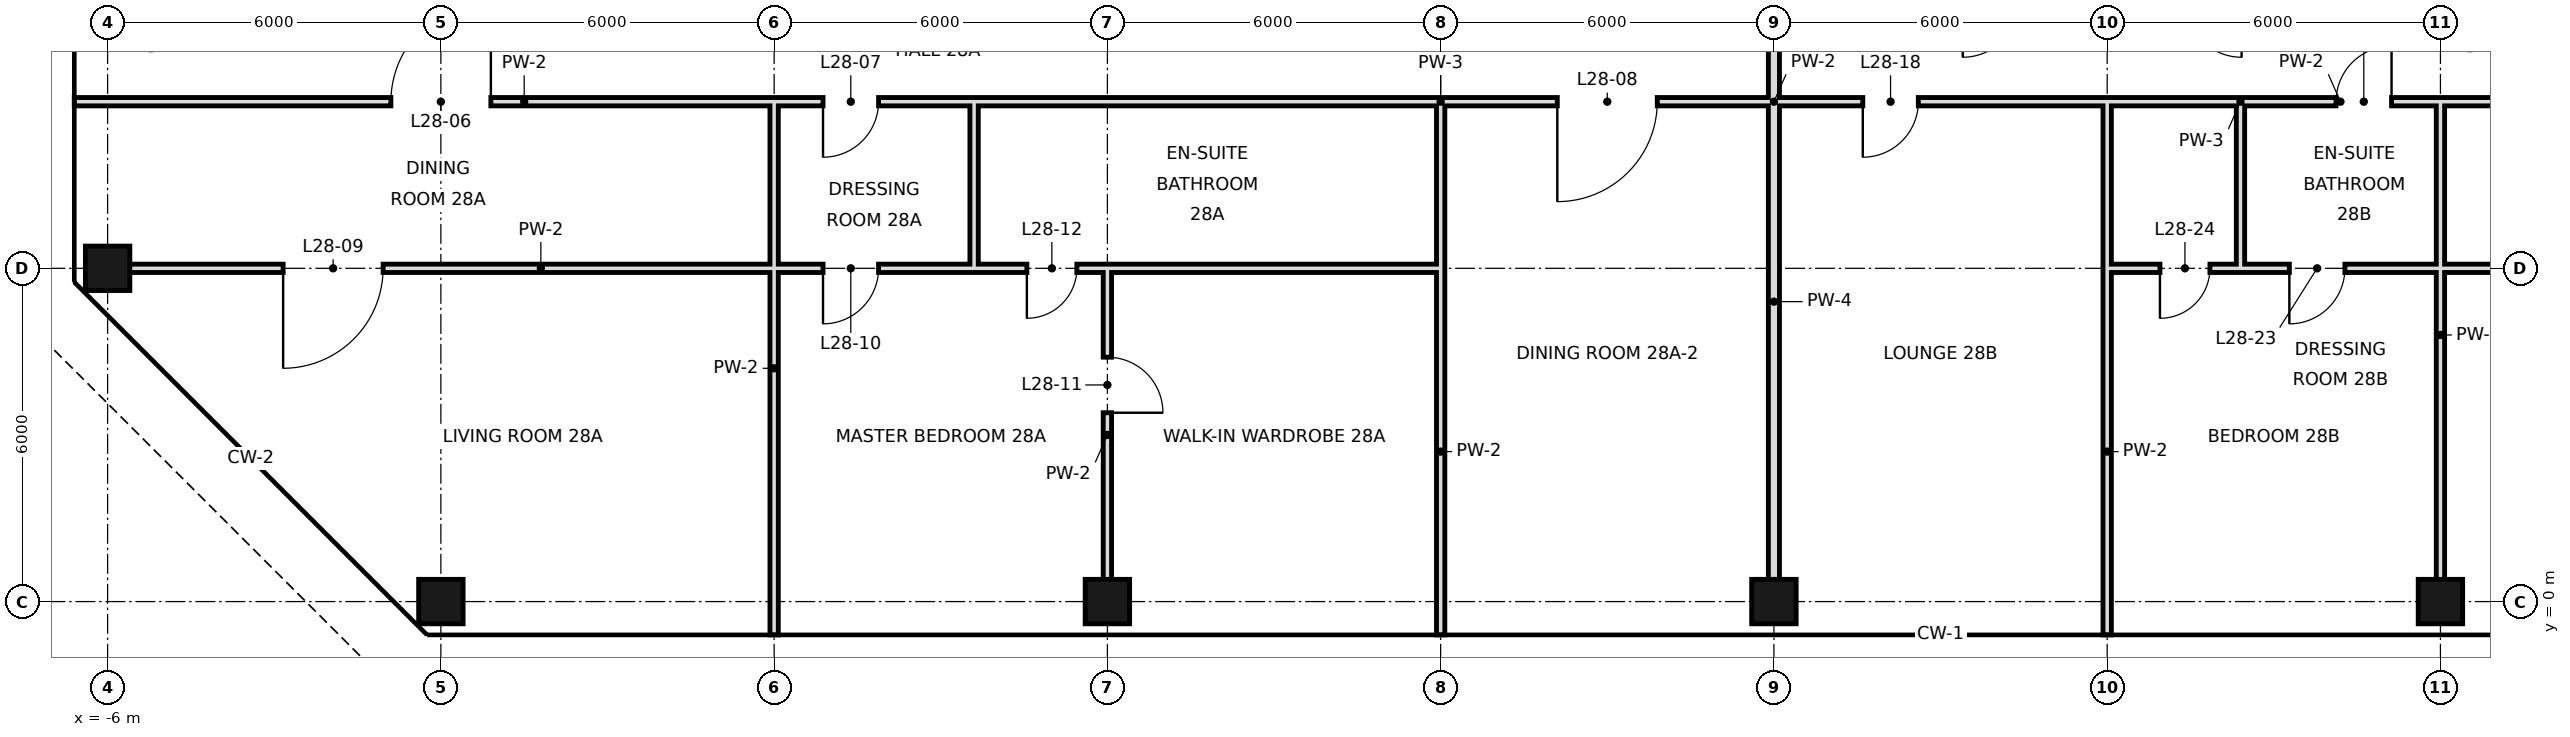
"""IFC4 building model, lengths in metres.
Left out: names, types, materials, properties, quantities, classifications, styles, units other than length and angle.
Written with IfcOpenShell. Run it as: python <this file> out.ifc"""

import sys

from ifc_helpers import new_model, si_unit, direction, frame, frame_2d, origin, origin_2d, place, context, subcontext, project, spatial, rectangle, hollow_rectangle, extrude, element, fill, save


model = new_model("IFC4")
c1 = context("Model", 3, precision=1e-05, world=origin(), true_north=direction((0.0, 1.0)))
c2 = subcontext(c1, "Body", "Model", "MODEL_VIEW")
j1 = project(units=[si_unit("LENGTHUNIT", "METRE"), si_unit("PLANEANGLEUNIT", "RADIAN")], contexts=[c1])
p1 = place(None, origin())
s1 = spatial("IfcSite", under=j1, at=p1, CompositionType="ELEMENT")
p2 = place(p1, origin())
s2 = spatial("IfcBuilding", under=s1, at=p2, CompositionType="ELEMENT")
p3 = place(p2, frame((0.0, 0.0, 126.8)))
s3 = spatial("IfcBuildingStorey", under=s2, at=p3, CompositionType="ELEMENT", Elevation=126.8)
for number, where, z_axis, x_axis in (
    (1, (-6.0, 6.0, 0.0), (0.0, 0.0, 1.0), (1.0, 0.0, 0.0)),
    (2, (0.0, 0.0, 0.0), (0.0, 0.0, 1.0), (1.0, 0.0, 0.0)),
    (3, (12.0, 0.0, 0.0), (0.0, 0.0, 1.0), (1.0, 0.0, 0.0)),
    (4, (24.0, 0.0, 0.0), (0.0, 0.0, 1.0), (1.0, 0.0, 0.0)),
    (5, (36.0, 0.0, 0.0), (0.0, 0.0, 1.0), (1.0, 0.0, 0.0)),
):
    element("IfcColumn", number, at=place(p3, frame(where, z_axis=z_axis, x_axis=x_axis)), inside=s3, PredefinedType="COLUMN", context=c2, shape_type="SweptSolid", body=[
        extrude(hollow_rectangle(XDim=0.8, YDim=0.8, WallThickness=0.04, at=origin_2d()), origin(), (0.0, 0.0, 1.0), 3.6),
    ])
p4 = place(p3, frame((12.0, 0.0, 0.0), z_axis=(0.0, 0.0, 1.0), x_axis=(0.0, 1.0, 0.0)))
e6 = element("IfcWall", 6, at=p4, inside=s3, PredefinedType="PARTITIONING", context=c2, shape_type="SweptSolid", body=[
    extrude(rectangle(XDim=6.0, YDim=0.15, at=frame_2d((3.0, 0.0))), origin(), (0.0, 0.0, 1.0), 2.72),
])
p5 = place(p4, frame((3.4, 0.0, 0.0)))
e7 = element("IfcOpeningElement", 7, at=p5, cuts=e6, PredefinedType="OPENING", context=c2, shape_type="SweptSolid", body=[
    extrude(rectangle(XDim=1.0, YDim=2.4, at=frame_2d((0.5, 1.2))), frame((0.0, 0.085, 0.0), z_axis=(0.0, -1.0, 0.0), x_axis=(1.0, 0.0, 0.0)), (0.0, 0.0, 1.0), 0.17),
])
p6 = place(p3, frame((18.0, -0.6, 0.0), z_axis=(0.0, 0.0, 1.0), x_axis=(0.0, 1.0, 0.0)))
e8 = element("IfcWall", 8, at=p6, inside=s3, PredefinedType="PARTITIONING", context=c2, shape_type="SweptSolid", body=[
    extrude(rectangle(XDim=6.6, YDim=0.15, at=frame_2d((3.3, 0.0))), origin(), (0.0, 0.0, 1.0), 2.72),
])
p7 = place(p3, frame((18.0, 6.0, 0.0), z_axis=(0.0, 0.0, 1.0), x_axis=(0.0, 1.0, 0.0)))
e9 = element("IfcWall", 9, at=p7, inside=s3, PredefinedType="PARTITIONING", context=c2, shape_type="SweptSolid", body=[
    extrude(rectangle(XDim=3.0, YDim=0.15, at=frame_2d((1.5, 0.0))), origin(), (0.0, 0.0, 1.0), 2.72),
])
p8 = place(p3, frame((24.0, 0.0, 0.0), z_axis=(0.0, 0.0, 1.0), x_axis=(0.0, 1.0, 0.0)))
e10 = element("IfcWall", 10, at=p8, inside=s3, PredefinedType="SOLIDWALL", context=c2, shape_type="SweptSolid", body=[
    extrude(rectangle(XDim=10.8, YDim=0.2, at=frame_2d((5.4, 0.0))), origin(), (0.0, 0.0, 1.0), 2.72),
])
p9 = place(p3, frame((30.0, -0.6, 0.0), z_axis=(0.0, 0.0, 1.0), x_axis=(0.0, 1.0, 0.0)))
e11 = element("IfcWall", 11, at=p9, inside=s3, PredefinedType="PARTITIONING", context=c2, shape_type="SweptSolid", body=[
    extrude(rectangle(XDim=6.6, YDim=0.15, at=frame_2d((3.3, 0.0))), origin(), (0.0, 0.0, 1.0), 2.72),
])
p10 = place(p3, frame((30.0, 6.0, 0.0), z_axis=(0.0, 0.0, 1.0), x_axis=(0.0, 1.0, 0.0)))
e12 = element("IfcWall", 12, at=p10, inside=s3, PredefinedType="PARTITIONING", context=c2, shape_type="SweptSolid", body=[
    extrude(rectangle(XDim=3.0, YDim=0.15, at=frame_2d((1.5, 0.0))), origin(), (0.0, 0.0, 1.0), 2.72),
])
p11 = place(p3, frame((32.4, 6.0, 0.0), z_axis=(0.0, 0.0, 1.0), x_axis=(0.0, 1.0, 0.0)))
e13 = element("IfcWall", 13, at=p11, inside=s3, PredefinedType="PARTITIONING", context=c2, shape_type="SweptSolid", body=[
    extrude(rectangle(XDim=3.0, YDim=0.15, at=frame_2d((1.5, 0.0))), origin(), (0.0, 0.0, 1.0), 3.42),
])
p12 = place(p3, frame((36.0, 0.0, 0.0), z_axis=(0.0, 0.0, 1.0), x_axis=(0.0, 1.0, 0.0)))
e14 = element("IfcWall", 14, at=p12, inside=s3, PredefinedType="PARTITIONING", context=c2, shape_type="SweptSolid", body=[
    extrude(rectangle(XDim=6.0, YDim=0.15, at=frame_2d((3.0, 0.0))), origin(), (0.0, 0.0, 1.0), 2.72),
])
p13 = place(p3, frame((36.0, 6.0, 0.0), z_axis=(0.0, 0.0, 1.0), x_axis=(0.0, 1.0, 0.0)))
e15 = element("IfcWall", 15, at=p13, inside=s3, PredefinedType="PARTITIONING", context=c2, shape_type="SweptSolid", body=[
    extrude(rectangle(XDim=3.0, YDim=0.15, at=frame_2d((1.5, 0.0))), origin(), (0.0, 0.0, 1.0), 2.72),
])
p14 = place(p3, frame((6.0, -0.6, 0.0), z_axis=(0.0, 0.0, 1.0), x_axis=(0.0, 1.0, 0.0)))
e16 = element("IfcWall", 16, at=p14, inside=s3, PredefinedType="PARTITIONING", context=c2, shape_type="SweptSolid", body=[
    extrude(rectangle(XDim=9.6, YDim=0.15, at=frame_2d((4.8, 0.0))), origin(), (0.0, 0.0, 1.0), 2.72),
])
p15 = place(p3, frame((9.6, 6.0, 0.0), z_axis=(0.0, 0.0, 1.0), x_axis=(0.0, 1.0, 0.0)))
e17 = element("IfcWall", 17, at=p15, inside=s3, PredefinedType="PARTITIONING", context=c2, shape_type="SweptSolid", body=[
    extrude(rectangle(XDim=3.0, YDim=0.15, at=frame_2d((1.5, 0.0))), origin(), (0.0, 0.0, 1.0), 3.42),
])
p16 = place(p3, frame((-6.0, 6.0, 0.0), z_axis=(0.0, 0.0, 1.0), x_axis=(1.0, 0.0, 0.0)))
e18 = element("IfcWall", 18, at=p16, inside=s3, PredefinedType="PARTITIONING", context=c2, shape_type="SweptSolid", body=[
    extrude(rectangle(XDim=15.6, YDim=0.15, at=frame_2d((7.8, 0.0))), origin(), (0.0, 0.0, 1.0), 2.97),
])
p17 = place(p16, frame((3.16, 0.0, 0.0)))
e19 = element("IfcOpeningElement", 19, at=p17, cuts=e18, PredefinedType="OPENING", context=c2, shape_type="SweptSolid", body=[
    extrude(rectangle(XDim=1.8, YDim=2.4, at=frame_2d((0.9, 1.2))), frame((0.0, 0.085, 0.0), z_axis=(0.0, -1.0, 0.0), x_axis=(1.0, 0.0, 0.0)), (0.0, 0.0, 1.0), 0.17),
])
p18 = place(p16, frame((12.88, 0.0, 0.0)))
e20 = element("IfcOpeningElement", 20, at=p18, cuts=e18, PredefinedType="OPENING", context=c2, shape_type="SweptSolid", body=[
    extrude(rectangle(XDim=1.0, YDim=2.4, at=frame_2d((0.5, 1.2))), frame((0.0, 0.085, 0.0), z_axis=(0.0, -1.0, 0.0), x_axis=(1.0, 0.0, 0.0)), (0.0, 0.0, 1.0), 0.17),
])
p19 = place(p3, frame((32.4, 6.0, 0.0), z_axis=(0.0, 0.0, 1.0), x_axis=(1.0, 0.0, 0.0)))
e21 = element("IfcWall", 21, at=p19, inside=s3, PredefinedType="PARTITIONING", context=c2, shape_type="SweptSolid", body=[
    extrude(rectangle(XDim=3.6, YDim=0.15, at=frame_2d((1.8, 0.0))), origin(), (0.0, 0.0, 1.0), 2.97),
])
p20 = place(p19, frame((0.88, 0.0, 0.0)))
e22 = element("IfcOpeningElement", 22, at=p20, cuts=e21, PredefinedType="OPENING", context=c2, shape_type="SweptSolid", body=[
    extrude(rectangle(XDim=1.0, YDim=2.4, at=frame_2d((0.5, 1.2))), frame((0.0, 0.085, 0.0), z_axis=(0.0, -1.0, 0.0), x_axis=(1.0, 0.0, 0.0)), (0.0, 0.0, 1.0), 0.17),
])
p21 = place(p3, frame((9.6, 6.0, 0.0), z_axis=(0.0, 0.0, 1.0), x_axis=(1.0, 0.0, 0.0)))
e23 = element("IfcWall", 23, at=p21, inside=s3, PredefinedType="PARTITIONING", context=c2, shape_type="SweptSolid", body=[
    extrude(rectangle(XDim=8.4, YDim=0.15, at=frame_2d((4.2, 0.0))), origin(), (0.0, 0.0, 1.0), 2.97),
])
p22 = place(p21, frame((0.95, 0.0, 0.0)))
e24 = element("IfcOpeningElement", 24, at=p22, cuts=e23, PredefinedType="OPENING", context=c2, shape_type="SweptSolid", body=[
    extrude(rectangle(XDim=0.9, YDim=2.4, at=frame_2d((0.45, 1.2))), frame((0.0, 0.085, 0.0), z_axis=(0.0, -1.0, 0.0), x_axis=(1.0, 0.0, 0.0)), (0.0, 0.0, 1.0), 0.17),
])
p23 = place(p3, frame((30.0, 6.0, 0.0), z_axis=(0.0, 0.0, 1.0), x_axis=(1.0, 0.0, 0.0)))
e25 = element("IfcWall", 25, at=p23, inside=s3, PredefinedType="PARTITIONING", context=c2, shape_type="SweptSolid", body=[
    extrude(rectangle(XDim=2.4, YDim=0.15, at=frame_2d((1.2, 0.0))), origin(), (0.0, 0.0, 1.0), 2.97),
])
p24 = place(p23, frame((0.95, 0.0, 0.0)))
e26 = element("IfcOpeningElement", 26, at=p24, cuts=e25, PredefinedType="OPENING", context=c2, shape_type="SweptSolid", body=[
    extrude(rectangle(XDim=0.9, YDim=2.4, at=frame_2d((0.45, 1.2))), frame((0.0, 0.085, 0.0), z_axis=(0.0, -1.0, 0.0), x_axis=(1.0, 0.0, 0.0)), (0.0, 0.0, 1.0), 0.17),
])
p25 = place(p3, frame((36.0, 6.0, 0.0), z_axis=(0.0, 0.0, 1.0), x_axis=(1.0, 0.0, 0.0)))
e27 = element("IfcWall", 27, at=p25, inside=s3, PredefinedType="PARTITIONING", context=c2, shape_type="SweptSolid", body=[
    extrude(rectangle(XDim=3.6, YDim=0.15, at=frame_2d((1.8, 0.0))), origin(), (0.0, 0.0, 1.0), 2.97),
])
p26 = place(p25, frame((1.79, 0.0, 0.0)))
e28 = element("IfcOpeningElement", 28, at=p26, cuts=e27, PredefinedType="OPENING", context=c2, shape_type="SweptSolid", body=[
    extrude(rectangle(XDim=0.9, YDim=2.4, at=frame_2d((0.45, 1.2))), frame((0.0, 0.085, 0.0), z_axis=(0.0, -1.0, 0.0), x_axis=(1.0, 0.0, 0.0)), (0.0, 0.0, 1.0), 0.17),
])
p27 = place(p3, frame((-6.6, 9.0, 0.0), z_axis=(0.0, 0.0, 1.0), x_axis=(1.0, 0.0, 0.0)))
e29 = element("IfcWall", 29, at=p27, inside=s3, PredefinedType="PARTITIONING", context=c2, shape_type="SweptSolid", body=[
    extrude(rectangle(XDim=16.2, YDim=0.15, at=frame_2d((8.1, 0.0))), origin(), (0.0, 0.0, 1.0), 3.42),
])
p28 = place(p27, frame((5.7, 0.0, 0.0)))
e30 = element("IfcOpeningElement", 30, at=p28, cuts=e29, PredefinedType="OPENING", context=c2, shape_type="SweptSolid", body=[
    extrude(rectangle(XDim=1.8, YDim=2.4, at=frame_2d((0.9, 1.2))), frame((0.0, 0.085, 0.0), z_axis=(0.0, -1.0, 0.0), x_axis=(1.0, 0.0, 0.0)), (0.0, 0.0, 1.0), 0.17),
])
p29 = place(p27, frame((13.48, 0.0, 0.0)))
e31 = element("IfcOpeningElement", 31, at=p29, cuts=e29, PredefinedType="OPENING", context=c2, shape_type="SweptSolid", body=[
    extrude(rectangle(XDim=1.0, YDim=2.4, at=frame_2d((0.5, 1.2))), frame((0.0, 0.085, 0.0), z_axis=(0.0, -1.0, 0.0), x_axis=(1.0, 0.0, 0.0)), (0.0, 0.0, 1.0), 0.17),
])
p30 = place(p3, frame((18.0, 9.0, 0.0), z_axis=(0.0, 0.0, 1.0), x_axis=(1.0, 0.0, 0.0)))
e32 = element("IfcWall", 32, at=p30, inside=s3, PredefinedType="PARTITIONING", context=c2, shape_type="SweptSolid", body=[
    extrude(rectangle(XDim=12.0, YDim=0.15, at=frame_2d((6.0, 0.0))), origin(), (0.0, 0.0, 1.0), 3.42),
])
p31 = place(p30, frame((2.1, 0.0, 0.0)))
e33 = element("IfcOpeningElement", 33, at=p31, cuts=e32, PredefinedType="OPENING", context=c2, shape_type="SweptSolid", body=[
    extrude(rectangle(XDim=1.8, YDim=2.4, at=frame_2d((0.9, 1.2))), frame((0.0, 0.085, 0.0), z_axis=(0.0, -1.0, 0.0), x_axis=(1.0, 0.0, 0.0)), (0.0, 0.0, 1.0), 0.17),
])
p32 = place(p30, frame((7.6, 0.0, 0.0)))
e34 = element("IfcOpeningElement", 34, at=p32, cuts=e32, PredefinedType="OPENING", context=c2, shape_type="SweptSolid", body=[
    extrude(rectangle(XDim=1.0, YDim=2.4, at=frame_2d((0.5, 1.2))), frame((0.0, 0.085, 0.0), z_axis=(0.0, -1.0, 0.0), x_axis=(1.0, 0.0, 0.0)), (0.0, 0.0, 1.0), 0.17),
])
p33 = place(p3, frame((32.4, 9.0, 0.0), z_axis=(0.0, 0.0, 1.0), x_axis=(1.0, 0.0, 0.0)))
e35 = element("IfcWall", 35, at=p33, inside=s3, PredefinedType="PARTITIONING", context=c2, shape_type="SweptSolid", body=[
    extrude(rectangle(XDim=3.6, YDim=0.15, at=frame_2d((1.8, 0.0))), origin(), (0.0, 0.0, 1.0), 3.42),
])
p34 = place(p33, frame((1.72, 0.0, 0.0)))
e36 = element("IfcOpeningElement", 36, at=p34, cuts=e35, PredefinedType="OPENING", context=c2, shape_type="SweptSolid", body=[
    extrude(rectangle(XDim=1.0, YDim=2.4, at=frame_2d((0.5, 1.2))), frame((0.0, 0.085, 0.0), z_axis=(0.0, -1.0, 0.0), x_axis=(1.0, 0.0, 0.0)), (0.0, 0.0, 1.0), 0.17),
])
p35 = place(p3, frame((9.6, 9.0, 0.0), z_axis=(0.0, 0.0, 1.0), x_axis=(1.0, 0.0, 0.0)))
e37 = element("IfcWall", 37, at=p35, inside=s3, PredefinedType="PARTITIONING", context=c2, shape_type="SweptSolid", body=[
    extrude(rectangle(XDim=8.4, YDim=0.15, at=frame_2d((4.2, 0.0))), origin(), (0.0, 0.0, 1.0), 3.42),
])
p36 = place(p3, frame((30.0, 9.0, 0.0), z_axis=(0.0, 0.0, 1.0), x_axis=(1.0, 0.0, 0.0)))
e38 = element("IfcWall", 38, at=p36, inside=s3, PredefinedType="PARTITIONING", context=c2, shape_type="SweptSolid", body=[
    extrude(rectangle(XDim=2.4, YDim=0.15, at=frame_2d((1.2, 0.0))), origin(), (0.0, 0.0, 1.0), 3.42),
])
p37 = place(p3, frame((36.0, 9.0, 0.0), z_axis=(0.0, 0.0, 1.0), x_axis=(1.0, 0.0, 0.0)))
e39 = element("IfcWall", 39, at=p37, inside=s3, PredefinedType="PARTITIONING", context=c2, shape_type="SweptSolid", body=[
    extrude(rectangle(XDim=3.6, YDim=0.15, at=frame_2d((1.8, 0.0))), origin(), (0.0, 0.0, 1.0), 3.42),
])
p38 = place(p28, frame((1.8, 0.0, 0.0), z_axis=(0.0, 0.0, 1.0), x_axis=(-1.0, 0.0, 0.0)))
e40 = element("IfcDoor", 40, at=p38, inside=s3, OperationType="SINGLE_SWING_LEFT", PredefinedType="DOOR", context=c2, shape_type="SweptSolid", body=[
    extrude(rectangle(XDim=1.8, YDim=2.4, at=frame_2d((0.9, 1.2))), frame((0.0, 0.025, 0.0), z_axis=(0.0, -1.0, 0.0), x_axis=(1.0, 0.0, 0.0)), (0.0, 0.0, 1.0), 0.05),
])
fill(e30, e40)
p39 = place(p29, frame((1.0, 0.0, 0.0), z_axis=(0.0, 0.0, 1.0), x_axis=(-1.0, 0.0, 0.0)))
e41 = element("IfcDoor", 41, at=p39, inside=s3, OperationType="SINGLE_SWING_RIGHT", PredefinedType="DOOR", context=c2, shape_type="SweptSolid", body=[
    extrude(rectangle(XDim=1.0, YDim=2.4, at=frame_2d((0.5, 1.2))), frame((0.0, 0.025, 0.0), z_axis=(0.0, -1.0, 0.0), x_axis=(1.0, 0.0, 0.0)), (0.0, 0.0, 1.0), 0.05),
])
fill(e31, e41)
p40 = place(p31, frame((1.8, 0.0, 0.0), z_axis=(0.0, 0.0, 1.0), x_axis=(-1.0, 0.0, 0.0)))
e42 = element("IfcDoor", 42, at=p40, inside=s3, OperationType="SINGLE_SWING_RIGHT", PredefinedType="DOOR", context=c2, shape_type="SweptSolid", body=[
    extrude(rectangle(XDim=1.8, YDim=2.4, at=frame_2d((0.9, 1.2))), frame((0.0, 0.025, 0.0), z_axis=(0.0, -1.0, 0.0), x_axis=(1.0, 0.0, 0.0)), (0.0, 0.0, 1.0), 0.05),
])
fill(e33, e42)
p41 = place(p17, frame((1.8, 0.0, 0.0), z_axis=(0.0, 0.0, 1.0), x_axis=(-1.0, 0.0, 0.0)))
e43 = element("IfcDoor", 43, at=p41, inside=s3, OperationType="SINGLE_SWING_RIGHT", PredefinedType="DOOR", context=c2, shape_type="SweptSolid", body=[
    extrude(rectangle(XDim=1.8, YDim=2.4, at=frame_2d((0.9, 1.2))), frame((0.0, 0.025, 0.0), z_axis=(0.0, -1.0, 0.0), x_axis=(1.0, 0.0, 0.0)), (0.0, 0.0, 1.0), 0.05),
])
fill(e19, e43)
p42 = place(p18, frame((1.0, 0.0, 0.0), z_axis=(0.0, 0.0, 1.0), x_axis=(-1.0, 0.0, 0.0)))
e44 = element("IfcDoor", 44, at=p42, inside=s3, OperationType="SINGLE_SWING_RIGHT", PredefinedType="DOOR", context=c2, shape_type="SweptSolid", body=[
    extrude(rectangle(XDim=1.0, YDim=2.4, at=frame_2d((0.5, 1.2))), frame((0.0, 0.025, 0.0), z_axis=(0.0, -1.0, 0.0), x_axis=(1.0, 0.0, 0.0)), (0.0, 0.0, 1.0), 0.05),
])
fill(e20, e44)
p43 = place(p5, frame((1.0, 0.0, 0.0), z_axis=(0.0, 0.0, 1.0), x_axis=(-1.0, 0.0, 0.0)))
e45 = element("IfcDoor", 45, at=p43, inside=s3, OperationType="SINGLE_SWING_RIGHT", PredefinedType="DOOR", context=c2, shape_type="SweptSolid", body=[
    extrude(rectangle(XDim=1.0, YDim=2.4, at=frame_2d((0.5, 1.2))), frame((0.0, 0.025, 0.0), z_axis=(0.0, -1.0, 0.0), x_axis=(1.0, 0.0, 0.0)), (0.0, 0.0, 1.0), 0.05),
])
fill(e7, e45)
p44 = place(p22, frame((0.9, 0.0, 0.0), z_axis=(0.0, 0.0, 1.0), x_axis=(-1.0, 0.0, 0.0)))
e46 = element("IfcDoor", 46, at=p44, inside=s3, OperationType="SINGLE_SWING_RIGHT", PredefinedType="DOOR", context=c2, shape_type="SweptSolid", body=[
    extrude(rectangle(XDim=0.9, YDim=2.4, at=frame_2d((0.45, 1.2))), frame((0.0, 0.025, 0.0), z_axis=(0.0, -1.0, 0.0), x_axis=(1.0, 0.0, 0.0)), (0.0, 0.0, 1.0), 0.05),
])
fill(e24, e46)
p45 = place(p32, frame((1.0, 0.0, 0.0), z_axis=(0.0, 0.0, 1.0), x_axis=(-1.0, 0.0, 0.0)))
e47 = element("IfcDoor", 47, at=p45, inside=s3, OperationType="SINGLE_SWING_RIGHT", PredefinedType="DOOR", context=c2, shape_type="SweptSolid", body=[
    extrude(rectangle(XDim=1.0, YDim=2.4, at=frame_2d((0.5, 1.2))), frame((0.0, 0.025, 0.0), z_axis=(0.0, -1.0, 0.0), x_axis=(1.0, 0.0, 0.0)), (0.0, 0.0, 1.0), 0.05),
])
fill(e34, e47)
p46 = place(p34, frame((1.0, 0.0, 0.0), z_axis=(0.0, 0.0, 1.0), x_axis=(-1.0, 0.0, 0.0)))
e48 = element("IfcDoor", 48, at=p46, inside=s3, OperationType="SINGLE_SWING_LEFT", PredefinedType="DOOR", context=c2, shape_type="SweptSolid", body=[
    extrude(rectangle(XDim=1.0, YDim=2.4, at=frame_2d((0.5, 1.2))), frame((0.0, 0.025, 0.0), z_axis=(0.0, -1.0, 0.0), x_axis=(1.0, 0.0, 0.0)), (0.0, 0.0, 1.0), 0.05),
])
fill(e36, e48)
p47 = place(p20, frame((1.0, 0.0, 0.0), z_axis=(0.0, 0.0, 1.0), x_axis=(-1.0, 0.0, 0.0)))
e49 = element("IfcDoor", 49, at=p47, inside=s3, OperationType="SINGLE_SWING_RIGHT", PredefinedType="DOOR", context=c2, shape_type="SweptSolid", body=[
    extrude(rectangle(XDim=1.0, YDim=2.4, at=frame_2d((0.5, 1.2))), frame((0.0, 0.025, 0.0), z_axis=(0.0, -1.0, 0.0), x_axis=(1.0, 0.0, 0.0)), (0.0, 0.0, 1.0), 0.05),
])
fill(e22, e49)
p48 = place(p24, frame((0.9, 0.0, 0.0), z_axis=(0.0, 0.0, 1.0), x_axis=(-1.0, 0.0, 0.0)))
e50 = element("IfcDoor", 50, at=p48, inside=s3, OperationType="SINGLE_SWING_RIGHT", PredefinedType="DOOR", context=c2, shape_type="SweptSolid", body=[
    extrude(rectangle(XDim=0.9, YDim=2.4, at=frame_2d((0.45, 1.2))), frame((0.0, 0.025, 0.0), z_axis=(0.0, -1.0, 0.0), x_axis=(1.0, 0.0, 0.0)), (0.0, 0.0, 1.0), 0.05),
])
fill(e26, e50)
save(model, sys.argv[1])
